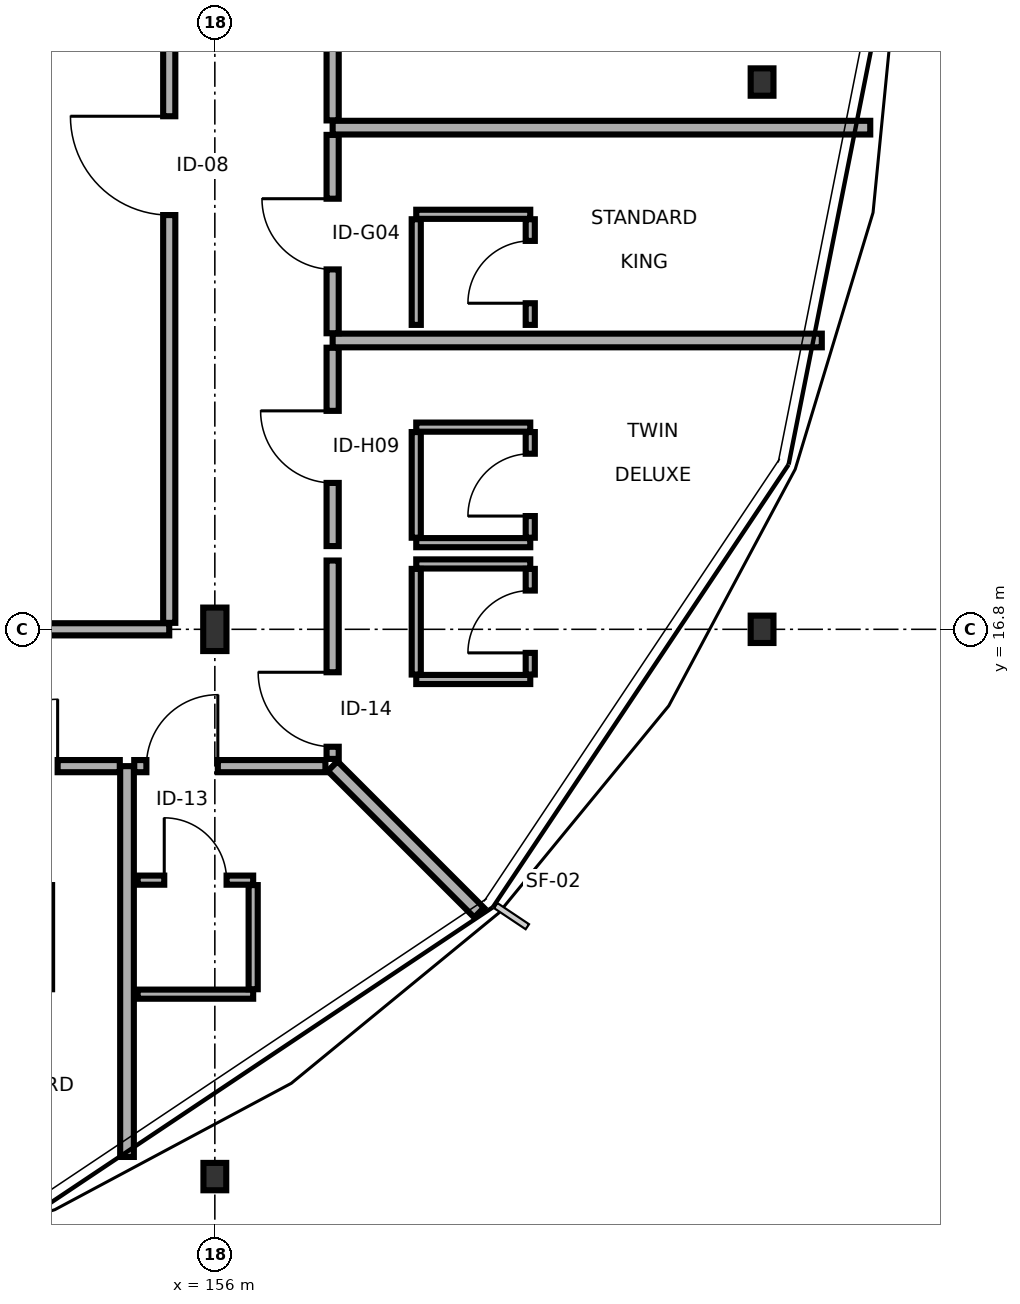
"""IFC4 building model, lengths in metres.
Left out: names, types, materials, properties, quantities, classifications, styles, units other than length and angle.
Written with IfcOpenShell. Run it as: python <this file> out.ifc"""

import sys

from ifc_helpers import new_model, si_unit, direction, frame, frame_2d, origin, origin_2d, place, context, subcontext, project, spatial, rectangle, i_section, extrude, element, fill, save


model = new_model("IFC4")
c1 = context("Model", 3, precision=1e-05, world=origin(), true_north=direction((0.0, 1.0)))
c2 = subcontext(c1, "Body", "Model", "MODEL_VIEW")
j1 = project(units=[si_unit("LENGTHUNIT", "METRE"), si_unit("PLANEANGLEUNIT", "RADIAN")], contexts=[c1])
p1 = place(None, origin())
s1 = spatial("IfcSite", under=j1, at=p1, CompositionType="ELEMENT")
p2 = place(p1, origin())
s2 = spatial("IfcBuilding", under=s1, at=p2, CompositionType="ELEMENT")
p3 = place(p2, frame((0.0, 0.0, 38.5)))
s3 = spatial("IfcBuildingStorey", under=s2, at=p3, CompositionType="ELEMENT", Elevation=38.5)
p4 = place(p3, frame((156.0, 16.8, 0.0), z_axis=(0.0, 0.0, 1.0), x_axis=(1.0, 0.0, 0.0)))
e1 = element("IfcColumn", 1, at=p4, inside=s3, PredefinedType="COLUMN", context=c2, shape_type="SweptSolid", body=[
    extrude(i_section(OverallWidth=0.306, OverallDepth=0.572, WebThickness=0.021, FlangeThickness=0.04, FilletRadius=0.027, at=origin_2d()), origin(), (0.0, 0.0, 1.0), 3.4),
])
for number, where, z_axis, x_axis in (
    (2, (156.0, 9.6, 0.0), (0.0, 0.0, 1.0), (1.0, 0.0, 0.0)),
    (3, (163.2, 16.8, 0.0), (0.0, 0.0, 1.0), (1.0, 0.0, 0.0)),
    (4, (163.2, 24.0, 0.0), (0.0, 0.0, 1.0), (1.0, 0.0, 0.0)),
):
    element("IfcColumn", number, at=place(p3, frame(where, z_axis=z_axis, x_axis=x_axis)), inside=s3, PredefinedType="COLUMN", context=c2, shape_type="SweptSolid", body=[
        extrude(i_section(OverallWidth=0.3, OverallDepth=0.36, WebThickness=0.012, FlangeThickness=0.022, FilletRadius=0.027, at=origin_2d()), origin(), (0.0, 0.0, 1.0), 3.4),
    ])
p5 = place(p3, frame((153.6, 16.8, 0.0), z_axis=(0.0, 0.0, 1.0), x_axis=(1.0, 0.0, 0.0)))
e5 = element("IfcWall", 5, at=p5, inside=s3, PredefinedType="PARTITIONING", context=c2, shape_type="SweptSolid", body=[
    extrude(rectangle(XDim=1.8, YDim=0.16, at=frame_2d((0.9, 0.0))), origin(), (0.0, 0.0, 1.0), 2.685),
])
p6 = place(p3, frame((155.4, 16.885, 0.0), z_axis=(0.0, 0.0, 1.0), x_axis=(0.0, 1.0, 0.0)))
e6 = element("IfcWall", 6, at=p6, inside=s3, PredefinedType="PARTITIONING", context=c2, shape_type="SweptSolid", body=[
    extrude(rectangle(XDim=12.03, YDim=0.16, at=frame_2d((6.015, 0.0))), origin(), (0.0, 0.0, 1.0), 2.685),
])
p7 = place(p6, frame((5.365, 0.0, 0.0)))
e7 = element("IfcOpeningElement", 7, at=p7, cuts=e6, PredefinedType="OPENING", context=c2, shape_type="SweptSolid", body=[
    extrude(rectangle(XDim=1.3, YDim=2.2, at=frame_2d((0.65, 1.1))), frame((0.0, 0.09, 0.0), z_axis=(0.0, -1.0, 0.0), x_axis=(1.0, 0.0, 0.0)), (0.0, 0.0, 1.0), 0.18),
])
p8 = place(p3, frame((157.55, 23.495, 0.0), z_axis=(0.0, 0.0, 1.0), x_axis=(0.0, 1.0, 0.0)))
e8 = element("IfcWall", 8, at=p8, inside=s3, PredefinedType="PARTITIONING", context=c2, shape_type="SweptSolid", body=[
    extrude(rectangle(XDim=5.41, YDim=0.16, at=frame_2d((2.705, 0.0))), origin(), (0.0, 0.0, 1.0), 2.735),
])
p9 = place(p8, frame((1.955, 0.0, 0.0)))
e9 = element("IfcOpeningElement", 9, at=p9, cuts=e8, PredefinedType="OPENING", context=c2, shape_type="SweptSolid", body=[
    extrude(rectangle(XDim=1.5, YDim=2.25, at=frame_2d((0.75, 1.125))), frame((0.0, 0.09, 0.0), z_axis=(0.0, -1.0, 0.0), x_axis=(1.0, 0.0, 0.0)), (0.0, 0.0, 1.0), 0.18),
])
p10 = place(p3, frame((152.234, 15.0, 0.0), z_axis=(0.0, 0.0, 1.0), x_axis=(1.0, 0.0, 0.0)))
e10 = element("IfcWall", 10, at=p10, inside=s3, PredefinedType="PARTITIONING", context=c2, shape_type="SweptSolid", body=[
    extrude(rectangle(XDim=2.516, YDim=0.16, at=frame_2d((1.258, 0.0))), origin(), (0.0, 0.0, 1.0), 3.15),
])
p11 = place(p10, frame((0.818, 0.0, 0.0)))
e11 = element("IfcOpeningElement", 11, at=p11, cuts=e10, PredefinedType="OPENING", context=c2, shape_type="SweptSolid", body=[
    extrude(rectangle(XDim=0.88, YDim=2.12, at=frame_2d((0.44, 1.06))), frame((0.0, 0.09, 0.0), z_axis=(0.0, -1.0, 0.0), x_axis=(1.0, 0.0, 0.0)), (0.0, 0.0, 1.0), 0.18),
])
p12 = place(p3, frame((153.799, 12.065, 0.0), z_axis=(0.0, 0.0, 1.0), x_axis=(0.0, 1.0, 0.0)))
e12 = element("IfcWall", 12, at=p12, inside=s3, PredefinedType="PARTITIONING", context=c2, shape_type="SweptSolid", body=[
    extrude(rectangle(XDim=1.37, YDim=0.12, at=frame_2d((0.685, 0.0))), origin(), (0.0, 0.0, 1.0), 3.15),
])
p13 = place(p3, frame((154.844, 9.858, 0.0), z_axis=(0.0, 0.0, 1.0), x_axis=(0.0, 1.0, 0.0)))
e13 = element("IfcWall", 13, at=p13, inside=s3, PredefinedType="PARTITIONING", context=c2, shape_type="SweptSolid", body=[
    extrude(rectangle(XDim=5.142, YDim=0.18, at=frame_2d((2.571, 0.0))), origin(), (0.0, 0.0, 1.0), 3.15),
])
p14 = place(p3, frame((154.939, 15.0, 0.0), z_axis=(0.0, 0.0, 1.0), x_axis=(1.0, 0.0, 0.0)))
e14 = element("IfcWall", 14, at=p14, inside=s3, PredefinedType="PARTITIONING", context=c2, shape_type="SweptSolid", body=[
    extrude(rectangle(XDim=2.516, YDim=0.16, at=frame_2d((1.258, 0.0))), origin(), (0.0, 0.0, 1.0), 2.735),
])
p15 = place(p14, frame((0.16, 0.0, 0.0)))
e15 = element("IfcOpeningElement", 15, at=p15, cuts=e14, PredefinedType="OPENING", context=c2, shape_type="SweptSolid", body=[
    extrude(rectangle(XDim=0.94, YDim=2.14, at=frame_2d((0.47, 1.07))), frame((0.0, 0.09, 0.0), z_axis=(0.0, -1.0, 0.0), x_axis=(1.0, 0.0, 0.0)), (0.0, 0.0, 1.0), 0.18),
])
p16 = place(p3, frame((154.984, 12.0, 0.0), z_axis=(0.0, 0.0, 1.0), x_axis=(1.0, 0.0, 0.0)))
e16 = element("IfcWall", 16, at=p16, inside=s3, PredefinedType="PARTITIONING", context=c2, shape_type="SweptSolid", body=[
    extrude(rectangle(XDim=1.52, YDim=0.12, at=frame_2d((0.76, 0.0))), origin(), (0.0, 0.0, 1.0), 2.735),
])
p17 = place(p3, frame((154.984, 13.5, 0.0), z_axis=(0.0, 0.0, 1.0), x_axis=(1.0, 0.0, 0.0)))
e17 = element("IfcWall", 17, at=p17, inside=s3, PredefinedType="PARTITIONING", context=c2, shape_type="SweptSolid", body=[
    extrude(rectangle(XDim=1.52, YDim=0.12, at=frame_2d((0.76, 0.0))), origin(), (0.0, 0.0, 1.0), 2.735),
])
p18 = place(p17, frame((0.35, 0.0, 0.0)))
e18 = element("IfcOpeningElement", 18, at=p18, cuts=e17, PredefinedType="OPENING", context=c2, shape_type="SweptSolid", body=[
    extrude(rectangle(XDim=0.82, YDim=2.08, at=frame_2d((0.41, 1.04))), frame((0.0, 0.07, 0.0), z_axis=(0.0, -1.0, 0.0), x_axis=(1.0, 0.0, 0.0)), (0.0, 0.0, 1.0), 0.14),
])
p19 = place(p3, frame((156.504, 12.065, 0.0), z_axis=(0.0, 0.0, 1.0), x_axis=(0.0, 1.0, 0.0)))
e19 = element("IfcWall", 19, at=p19, inside=s3, PredefinedType="PARTITIONING", context=c2, shape_type="SweptSolid", body=[
    extrude(rectangle(XDim=1.37, YDim=0.12, at=frame_2d((0.685, 0.0))), origin(), (0.0, 0.0, 1.0), 3.15),
])
p20 = place(p3, frame((157.55, 15.0, 0.0), z_axis=(0.0, 0.0, 1.0), x_axis=(0.707106781187, -0.707106781187, 0.0)))
e20 = element("IfcWall", 20, at=p20, inside=s3, PredefinedType="PARTITIONING", context=c2, shape_type="SweptSolid", body=[
    extrude(rectangle(XDim=2.725, YDim=0.18, at=frame_2d((1.363, 0.0))), origin(), (0.0, 0.0, 1.0), 2.695),
])
p21 = place(p3, frame((157.55, 15.095, 0.0), z_axis=(0.0, 0.0, 1.0), x_axis=(0.0, 1.0, 0.0)))
e21 = element("IfcWall", 21, at=p21, inside=s3, PredefinedType="PARTITIONING", context=c2, shape_type="SweptSolid", body=[
    extrude(rectangle(XDim=2.61, YDim=0.16, at=frame_2d((1.305, 0.0))), origin(), (0.0, 0.0, 1.0), 2.735),
])
p22 = place(p21, frame((0.16, 0.0, 0.0)))
e22 = element("IfcOpeningElement", 22, at=p22, cuts=e21, PredefinedType="OPENING", context=c2, shape_type="SweptSolid", body=[
    extrude(rectangle(XDim=0.98, YDim=2.16, at=frame_2d((0.49, 1.08))), frame((0.0, 0.09, 0.0), z_axis=(0.0, -1.0, 0.0), x_axis=(1.0, 0.0, 0.0)), (0.0, 0.0, 1.0), 0.18),
])
for number, where, z_axis, x_axis in (
    (23, (158.65, 16.14, 0.0), (0.0, 0.0, 1.0), (1.0, 0.0, 0.0)),
    (24, (158.65, 17.66, 0.0), (0.0, 0.0, 1.0), (1.0, 0.0, 0.0)),
):
    element("IfcWall", number, at=place(p3, frame(where, z_axis=z_axis, x_axis=x_axis)), inside=s3, PredefinedType="PARTITIONING", context=c2, shape_type="SweptSolid", body=[
        extrude(rectangle(XDim=1.5, YDim=0.12, at=frame_2d((0.75, 0.0))), origin(), (0.0, 0.0, 1.0), 3.15),
    ])
p23 = place(p3, frame((158.65, 16.205, 0.0), z_axis=(0.0, 0.0, 1.0), x_axis=(0.0, 1.0, 0.0)))
e25 = element("IfcWall", 25, at=p23, inside=s3, PredefinedType="PARTITIONING", context=c2, shape_type="SweptSolid", body=[
    extrude(rectangle(XDim=1.39, YDim=0.12, at=frame_2d((0.695, 0.0))), origin(), (0.0, 0.0, 1.0), 2.735),
])
p24 = place(p3, frame((160.15, 16.205, 0.0), z_axis=(0.0, 0.0, 1.0), x_axis=(0.0, 1.0, 0.0)))
e26 = element("IfcWall", 26, at=p24, inside=s3, PredefinedType="PARTITIONING", context=c2, shape_type="SweptSolid", body=[
    extrude(rectangle(XDim=1.39, YDim=0.12, at=frame_2d((0.695, 0.0))), origin(), (0.0, 0.0, 1.0), 2.735),
])
p25 = place(p24, frame((0.285, 0.0, 0.0)))
e27 = element("IfcOpeningElement", 27, at=p25, cuts=e26, PredefinedType="OPENING", context=c2, shape_type="SweptSolid", body=[
    extrude(rectangle(XDim=0.82, YDim=2.08, at=frame_2d((0.41, 1.04))), frame((0.0, 0.07, 0.0), z_axis=(0.0, -1.0, 0.0), x_axis=(1.0, 0.0, 0.0)), (0.0, 0.0, 1.0), 0.14),
])
p26 = place(p3, frame((157.55, 17.895, 0.0), z_axis=(0.0, 0.0, 1.0), x_axis=(0.0, 1.0, 0.0)))
e28 = element("IfcWall", 28, at=p26, inside=s3, PredefinedType="PARTITIONING", context=c2, shape_type="SweptSolid", body=[
    extrude(rectangle(XDim=2.61, YDim=0.16, at=frame_2d((1.305, 0.0))), origin(), (0.0, 0.0, 1.0), 3.15),
])
p27 = place(p26, frame((0.831, 0.0, 0.0)))
e29 = element("IfcOpeningElement", 29, at=p27, cuts=e28, PredefinedType="OPENING", context=c2, shape_type="SweptSolid", body=[
    extrude(rectangle(XDim=0.948, YDim=2.1, at=frame_2d((0.474, 1.05))), frame((0.0, 0.09, 0.0), z_axis=(0.0, -1.0, 0.0), x_axis=(1.0, 0.0, 0.0)), (0.0, 0.0, 1.0), 0.18),
])
for number, where, z_axis, x_axis in (
    (30, (158.65, 17.94, 0.0), (0.0, 0.0, 1.0), (1.0, 0.0, 0.0)),
    (31, (158.65, 19.46, 0.0), (0.0, 0.0, 1.0), (1.0, 0.0, 0.0)),
):
    element("IfcWall", number, at=place(p3, frame(where, z_axis=z_axis, x_axis=x_axis)), inside=s3, PredefinedType="PARTITIONING", context=c2, shape_type="SweptSolid", body=[
        extrude(rectangle(XDim=1.5, YDim=0.12, at=frame_2d((0.75, 0.0))), origin(), (0.0, 0.0, 1.0), 3.15),
    ])
p28 = place(p3, frame((158.65, 18.005, 0.0), z_axis=(0.0, 0.0, 1.0), x_axis=(0.0, 1.0, 0.0)))
e32 = element("IfcWall", 32, at=p28, inside=s3, PredefinedType="PARTITIONING", context=c2, shape_type="SweptSolid", body=[
    extrude(rectangle(XDim=1.39, YDim=0.12, at=frame_2d((0.695, 0.0))), origin(), (0.0, 0.0, 1.0), 3.15),
])
p29 = place(p3, frame((160.15, 18.005, 0.0), z_axis=(0.0, 0.0, 1.0), x_axis=(0.0, 1.0, 0.0)))
e33 = element("IfcWall", 33, at=p29, inside=s3, PredefinedType="PARTITIONING", context=c2, shape_type="SweptSolid", body=[
    extrude(rectangle(XDim=1.39, YDim=0.12, at=frame_2d((0.695, 0.0))), origin(), (0.0, 0.0, 1.0), 3.15),
])
p30 = place(p29, frame((0.285, 0.0, 0.0)))
e34 = element("IfcOpeningElement", 34, at=p30, cuts=e33, PredefinedType="OPENING", context=c2, shape_type="SweptSolid", body=[
    extrude(rectangle(XDim=0.82, YDim=2.08, at=frame_2d((0.41, 1.04))), frame((0.0, 0.07, 0.0), z_axis=(0.0, -1.0, 0.0), x_axis=(1.0, 0.0, 0.0)), (0.0, 0.0, 1.0), 0.14),
])
p31 = place(p3, frame((157.55, 20.6, 0.0), z_axis=(0.0, 0.0, 1.0), x_axis=(1.0, 0.0, 0.0)))
e35 = element("IfcWall", 35, at=p31, inside=s3, PredefinedType="PARTITIONING", context=c2, shape_type="SweptSolid", body=[
    extrude(rectangle(XDim=6.436, YDim=0.18, at=frame_2d((3.218, 0.0))), origin(), (0.0, 0.0, 1.0), 2.695),
])
p32 = place(p3, frame((157.55, 20.695, 0.0), z_axis=(0.0, 0.0, 1.0), x_axis=(0.0, 1.0, 0.0)))
e36 = element("IfcWall", 36, at=p32, inside=s3, PredefinedType="PARTITIONING", context=c2, shape_type="SweptSolid", body=[
    extrude(rectangle(XDim=2.61, YDim=0.16, at=frame_2d((1.305, 0.0))), origin(), (0.0, 0.0, 1.0), 3.15),
])
p33 = place(p32, frame((0.84, 0.0, 0.0)))
e37 = element("IfcOpeningElement", 37, at=p33, cuts=e36, PredefinedType="OPENING", context=c2, shape_type="SweptSolid", body=[
    extrude(rectangle(XDim=0.93, YDim=2.05, at=frame_2d((0.465, 1.025))), frame((0.0, 0.09, 0.0), z_axis=(0.0, -1.0, 0.0), x_axis=(1.0, 0.0, 0.0)), (0.0, 0.0, 1.0), 0.18),
])
p34 = place(p3, frame((158.65, 22.26, 0.0), z_axis=(0.0, 0.0, 1.0), x_axis=(1.0, 0.0, 0.0)))
e38 = element("IfcWall", 38, at=p34, inside=s3, PredefinedType="PARTITIONING", context=c2, shape_type="SweptSolid", body=[
    extrude(rectangle(XDim=1.5, YDim=0.12, at=frame_2d((0.75, 0.0))), origin(), (0.0, 0.0, 1.0), 3.15),
])
p35 = place(p3, frame((158.65, 20.805, 0.0), z_axis=(0.0, 0.0, 1.0), x_axis=(0.0, 1.0, 0.0)))
e39 = element("IfcWall", 39, at=p35, inside=s3, PredefinedType="PARTITIONING", context=c2, shape_type="SweptSolid", body=[
    extrude(rectangle(XDim=1.39, YDim=0.12, at=frame_2d((0.695, 0.0))), origin(), (0.0, 0.0, 1.0), 3.15),
])
p36 = place(p3, frame((160.15, 20.805, 0.0), z_axis=(0.0, 0.0, 1.0), x_axis=(0.0, 1.0, 0.0)))
e40 = element("IfcWall", 40, at=p36, inside=s3, PredefinedType="PARTITIONING", context=c2, shape_type="SweptSolid", body=[
    extrude(rectangle(XDim=1.39, YDim=0.12, at=frame_2d((0.695, 0.0))), origin(), (0.0, 0.0, 1.0), 3.15),
])
p37 = place(p36, frame((0.285, 0.0, 0.0)))
e41 = element("IfcOpeningElement", 41, at=p37, cuts=e40, PredefinedType="OPENING", context=c2, shape_type="SweptSolid", body=[
    extrude(rectangle(XDim=0.82, YDim=2.08, at=frame_2d((0.41, 1.04))), frame((0.0, 0.07, 0.0), z_axis=(0.0, -1.0, 0.0), x_axis=(1.0, 0.0, 0.0)), (0.0, 0.0, 1.0), 0.14),
])
p38 = place(p3, frame((157.55, 23.4, 0.0), z_axis=(0.0, 0.0, 1.0), x_axis=(1.0, 0.0, 0.0)))
e42 = element("IfcWall", 42, at=p38, inside=s3, PredefinedType="PARTITIONING", context=c2, shape_type="SweptSolid", body=[
    extrude(rectangle(XDim=7.073, YDim=0.18, at=frame_2d((3.537, 0.0))), origin(), (0.0, 0.0, 1.0), 2.695),
])
p39 = place(p7, origin())
e43 = element("IfcDoor", 43, at=p39, inside=s3, OperationType="SINGLE_SWING_RIGHT", PredefinedType="DOOR", context=c2, shape_type="SweptSolid", body=[
    extrude(rectangle(XDim=1.3, YDim=2.2, at=frame_2d((0.65, 1.1))), frame((0.0, 0.025, 0.0), z_axis=(0.0, -1.0, 0.0), x_axis=(1.0, 0.0, 0.0)), (0.0, 0.0, 1.0), 0.05),
])
fill(e7, e43)
p40 = place(p11, origin())
e44 = element("IfcDoor", 44, at=p40, inside=s3, OperationType="SINGLE_SWING_RIGHT", PredefinedType="DOOR", context=c2, shape_type="SweptSolid", body=[
    extrude(rectangle(XDim=0.88, YDim=2.12, at=frame_2d((0.44, 1.06))), frame((0.0, 0.025, 0.0), z_axis=(0.0, -1.0, 0.0), x_axis=(1.0, 0.0, 0.0)), (0.0, 0.0, 1.0), 0.05),
])
fill(e11, e44)
p41 = place(p15, origin())
e45 = element("IfcDoor", 45, at=p41, inside=s3, OperationType="SINGLE_SWING_RIGHT", PredefinedType="DOOR", context=c2, shape_type="SweptSolid", body=[
    extrude(rectangle(XDim=0.94, YDim=2.14, at=frame_2d((0.47, 1.07))), frame((0.0, 0.025, 0.0), z_axis=(0.0, -1.0, 0.0), x_axis=(1.0, 0.0, 0.0)), (0.0, 0.0, 1.0), 0.05),
])
fill(e15, e45)
p42 = place(p18, origin())
e46 = element("IfcDoor", 46, at=p42, inside=s3, OperationType="SINGLE_SWING_LEFT", PredefinedType="DOOR", context=c2, shape_type="SweptSolid", body=[
    extrude(rectangle(XDim=0.82, YDim=2.08, at=frame_2d((0.41, 1.04))), frame((0.0, 0.025, 0.0), z_axis=(0.0, -1.0, 0.0), x_axis=(1.0, 0.0, 0.0)), (0.0, 0.0, 1.0), 0.05),
])
fill(e18, e46)
p43 = place(p22, origin())
e47 = element("IfcDoor", 47, at=p43, inside=s3, OperationType="SINGLE_SWING_RIGHT", PredefinedType="DOOR", context=c2, shape_type="SweptSolid", body=[
    extrude(rectangle(XDim=0.98, YDim=2.16, at=frame_2d((0.49, 1.08))), frame((0.0, 0.025, 0.0), z_axis=(0.0, -1.0, 0.0), x_axis=(1.0, 0.0, 0.0)), (0.0, 0.0, 1.0), 0.05),
])
fill(e22, e47)
p44 = place(p25, origin())
e48 = element("IfcDoor", 48, at=p44, inside=s3, OperationType="SINGLE_SWING_LEFT", PredefinedType="DOOR", context=c2, shape_type="SweptSolid", body=[
    extrude(rectangle(XDim=0.82, YDim=2.08, at=frame_2d((0.41, 1.04))), frame((0.0, 0.025, 0.0), z_axis=(0.0, -1.0, 0.0), x_axis=(1.0, 0.0, 0.0)), (0.0, 0.0, 1.0), 0.05),
])
fill(e27, e48)
p45 = place(p27, origin())
e49 = element("IfcDoor", 49, at=p45, inside=s3, OperationType="SINGLE_SWING_RIGHT", PredefinedType="DOOR", context=c2, shape_type="SweptSolid", body=[
    extrude(rectangle(XDim=0.948, YDim=2.1, at=frame_2d((0.474, 1.05))), frame((0.0, 0.025, 0.0), z_axis=(0.0, -1.0, 0.0), x_axis=(1.0, 0.0, 0.0)), (0.0, 0.0, 1.0), 0.05),
])
fill(e29, e49)
p46 = place(p30, origin())
e50 = element("IfcDoor", 50, at=p46, inside=s3, OperationType="SINGLE_SWING_LEFT", PredefinedType="DOOR", context=c2, shape_type="SweptSolid", body=[
    extrude(rectangle(XDim=0.82, YDim=2.08, at=frame_2d((0.41, 1.04))), frame((0.0, 0.025, 0.0), z_axis=(0.0, -1.0, 0.0), x_axis=(1.0, 0.0, 0.0)), (0.0, 0.0, 1.0), 0.05),
])
fill(e34, e50)
p47 = place(p33, origin())
e51 = element("IfcDoor", 51, at=p47, inside=s3, OperationType="SINGLE_SWING_RIGHT", PredefinedType="DOOR", context=c2, shape_type="SweptSolid", body=[
    extrude(rectangle(XDim=0.93, YDim=2.05, at=frame_2d((0.465, 1.025))), frame((0.0, 0.025, 0.0), z_axis=(0.0, -1.0, 0.0), x_axis=(1.0, 0.0, 0.0)), (0.0, 0.0, 1.0), 0.05),
])
fill(e37, e51)
p48 = place(p37, origin())
e52 = element("IfcDoor", 52, at=p48, inside=s3, OperationType="SINGLE_SWING_LEFT", PredefinedType="DOOR", context=c2, shape_type="SweptSolid", body=[
    extrude(rectangle(XDim=0.82, YDim=2.08, at=frame_2d((0.41, 1.04))), frame((0.0, 0.025, 0.0), z_axis=(0.0, -1.0, 0.0), x_axis=(1.0, 0.0, 0.0)), (0.0, 0.0, 1.0), 0.05),
])
fill(e41, e52)
save(model, sys.argv[1])
